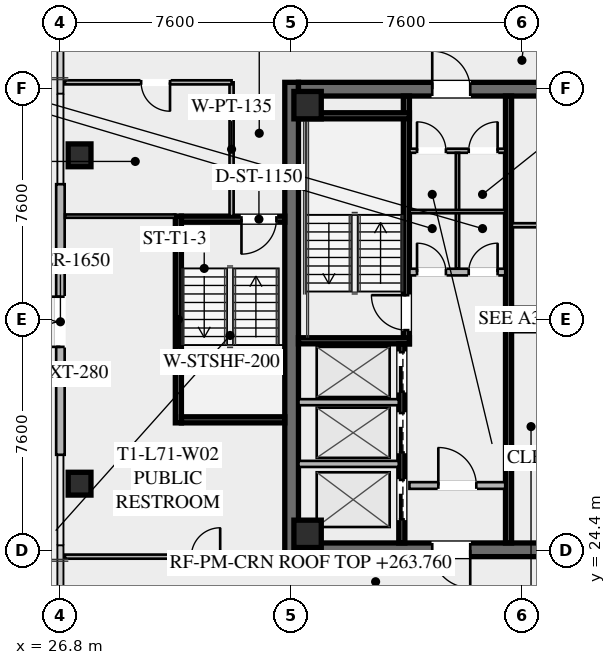
"""IFC4 building model, lengths in metres.
Left out: names, types, materials, properties, quantities, classifications, styles, units other than length and angle.
Written with IfcOpenShell. Run it as: python <this file> out.ifc"""

import sys

from ifc_helpers import new_model, si_unit, direction, frame, frame_2d, origin, origin_2d, place, context, subcontext, project, spatial, rectangle, hollow_rectangle, extrude, element, fill, save


model = new_model("IFC4")
c1 = context("Model", 3, precision=1e-05, world=origin(), true_north=direction((0.0, 1.0)))
c2 = subcontext(c1, "Body", "Model", "MODEL_VIEW")
j1 = project(units=[si_unit("LENGTHUNIT", "METRE"), si_unit("PLANEANGLEUNIT", "RADIAN")], contexts=[c1])
p1 = place(None, origin())
s1 = spatial("IfcSite", under=j1, at=p1, CompositionType="ELEMENT")
p2 = place(p1, origin())
s2 = spatial("IfcBuilding", under=s1, at=p2, CompositionType="ELEMENT")
p3 = place(p2, frame((0.0, 0.0, 263.4)))
s3 = spatial("IfcBuildingStorey", under=s2, at=p3, CompositionType="ELEMENT", Elevation=263.4)
p4 = place(p3, frame((34.425, 24.2, 0.0), z_axis=(0.0, 0.0, 1.0), x_axis=(0.0, 1.0, 0.0)))
e1 = element("IfcWall", 1, at=p4, inside=s3, PredefinedType="SHEAR", context=c2, shape_type="SweptSolid", body=[
    extrude(rectangle(XDim=15.6, YDim=0.45, at=frame_2d((7.8, 0.0))), origin(), (0.0, 0.0, 1.0), 3.55),
])
p5 = place(p3, frame((49.35, 24.425, 0.0), z_axis=(0.0, 0.0, 1.0), x_axis=(-1.0, 0.0, 0.0)))
e2 = element("IfcWall", 2, at=p5, inside=s3, PredefinedType="SHEAR", context=c2, shape_type="SweptSolid", body=[
    extrude(rectangle(XDim=14.7, YDim=0.45, at=frame_2d((7.35, 0.0))), origin(), (0.0, 0.0, 1.0), 3.55),
])
p6 = place(p5, frame((9.05, 0.0, 0.0)))
e3 = element("IfcOpeningElement", 3, at=p6, cuts=e2, PredefinedType="OPENING", context=c2, shape_type="SweptSolid", body=[
    extrude(rectangle(XDim=1.25, YDim=2.25, at=frame_2d((0.625, 1.125))), frame((0.0, 0.235, 0.0), z_axis=(0.0, -1.0, 0.0), x_axis=(1.0, 0.0, 0.0)), (0.0, 0.0, 1.0), 0.47),
])
p7 = place(p5, frame((4.0, 0.0, 0.0)))
e4 = element("IfcOpeningElement", 4, at=p7, cuts=e2, PredefinedType="OPENING", context=c2, shape_type="SweptSolid", body=[
    extrude(rectangle(XDim=1.25, YDim=2.25, at=frame_2d((0.625, 1.125))), frame((0.0, 0.235, 0.0), z_axis=(0.0, -1.0, 0.0), x_axis=(1.0, 0.0, 0.0)), (0.0, 0.0, 1.0), 0.47),
])
p8 = place(p3, frame((34.65, 39.575, 0.0), z_axis=(0.0, 0.0, 1.0), x_axis=(1.0, 0.0, 0.0)))
e5 = element("IfcWall", 5, at=p8, inside=s3, PredefinedType="SHEAR", context=c2, shape_type="SweptSolid", body=[
    extrude(rectangle(XDim=14.7, YDim=0.45, at=frame_2d((7.35, 0.0))), origin(), (0.0, 0.0, 1.0), 3.55),
])
p9 = place(p8, frame((4.4, 0.0, 0.0)))
e6 = element("IfcOpeningElement", 6, at=p9, cuts=e5, PredefinedType="OPENING", context=c2, shape_type="SweptSolid", body=[
    extrude(rectangle(XDim=1.25, YDim=2.25, at=frame_2d((0.625, 1.125))), frame((0.0, 0.235, 0.0), z_axis=(0.0, -1.0, 0.0), x_axis=(1.0, 0.0, 0.0)), (0.0, 0.0, 1.0), 0.47),
])
p10 = place(p8, frame((9.45, 0.0, 0.0)))
e7 = element("IfcOpeningElement", 7, at=p10, cuts=e5, PredefinedType="OPENING", context=c2, shape_type="SweptSolid", body=[
    extrude(rectangle(XDim=1.25, YDim=2.25, at=frame_2d((0.625, 1.125))), frame((0.0, 0.235, 0.0), z_axis=(0.0, -1.0, 0.0), x_axis=(1.0, 0.0, 0.0)), (0.0, 0.0, 1.0), 0.47),
])
for number, where, z_axis, x_axis in (
    (8, (34.95, 24.95, 0.0), (0.0, 0.0, 1.0), (1.0, 0.0, 0.0)),
    (9, (34.95, 39.05, 0.0), (0.0, 0.0, 1.0), (1.0, 0.0, 0.0)),
):
    element("IfcColumn", number, at=place(p3, frame(where, z_axis=z_axis, x_axis=x_axis)), inside=s3, PredefinedType="COLUMN", context=c2, shape_type="SweptSolid", body=[
        extrude(hollow_rectangle(XDim=0.9, YDim=0.9, WallThickness=0.04, at=origin_2d()), origin(), (0.0, 0.0, 1.0), 3.37),
    ])
for number, where, z_axis, x_axis in (
    (10, (27.45, 37.4, -0.295), (0.0, 0.0, 1.0), (1.0, 0.0, 0.0)),
    (11, (27.45, 26.6, -0.295), (0.0, 0.0, 1.0), (1.0, 0.0, 0.0)),
):
    element("IfcColumn", number, at=place(p3, frame(where, z_axis=z_axis, x_axis=x_axis)), inside=s3, PredefinedType="COLUMN", context=c2, shape_type="SweptSolid", body=[
        extrude(hollow_rectangle(XDim=0.75, YDim=0.75, WallThickness=0.032, at=origin_2d()), origin(), (0.0, 0.0, 1.0), 3.665),
    ])
p11 = place(p3, frame((26.82, 27.55, 0.0), z_axis=(0.0, 0.0, 1.0), x_axis=(0.0, 1.0, 0.0)))
e12 = element("IfcWall", 12, at=p11, inside=s3, PredefinedType="SOLIDWALL", context=c2, shape_type="SweptSolid", body=[
    extrude(rectangle(XDim=8.9, YDim=0.28, at=frame_2d((4.45, 0.0))), origin(), (0.0, 0.0, 1.0), 3.37),
])
p12 = place(p11, frame((3.55, 0.0, 0.0)))
e13 = element("IfcOpeningElement", 13, at=p12, cuts=e12, PredefinedType="OPENING", context=c2, shape_type="SweptSolid", body=[
    extrude(rectangle(XDim=1.65, YDim=2.2, at=frame_2d((0.825, 1.1))), frame((0.0, 0.15, 0.0), z_axis=(0.0, -1.0, 0.0), x_axis=(1.0, 0.0, 0.0)), (0.0, 0.0, 1.0), 0.3),
])
p13 = place(p3, frame((38.2, 31.2, 0.0), z_axis=(0.0, 0.0, 1.0), x_axis=(0.0, 1.0, 0.0)))
e14 = element("IfcWall", 14, at=p13, inside=s3, PredefinedType="SHEAR", context=c2, shape_type="SweptSolid", body=[
    extrude(rectangle(XDim=8.15, YDim=0.2, at=frame_2d((4.075, 0.0))), origin(), (0.0, 0.0, 1.0), 3.37),
])
p14 = place(p13, frame((0.45, 0.0, 0.0)))
e15 = element("IfcOpeningElement", 15, at=p14, cuts=e14, PredefinedType="OPENING", context=c2, shape_type="SweptSolid", body=[
    extrude(rectangle(XDim=1.15, YDim=2.2, at=frame_2d((0.575, 1.1))), frame((0.0, 0.11, 0.0), z_axis=(0.0, -1.0, 0.0), x_axis=(1.0, 0.0, 0.0)), (0.0, 0.0, 1.0), 0.22),
])
for number, where, z_axis, x_axis in (
    (16, (34.65, 31.3, 0.0), (0.0, 0.0, 1.0), (1.0, 0.0, 0.0)),
    (17, (34.65, 38.7, 0.0), (0.0, 0.0, 1.0), (1.0, 0.0, 0.0)),
):
    element("IfcWall", number, at=place(p3, frame(where, z_axis=z_axis, x_axis=x_axis)), inside=s3, PredefinedType="SHEAR", context=c2, shape_type="SweptSolid", body=[
        extrude(rectangle(XDim=3.65, YDim=0.2, at=frame_2d((1.825, 0.0))), origin(), (0.0, 0.0, 1.0), 3.37),
    ])
p15 = place(p3, frame((41.56, 24.65, 0.0), z_axis=(0.0, 0.0, 1.0), x_axis=(0.0, 1.0, 0.0)))
e18 = element("IfcWall", 18, at=p15, inside=s3, PredefinedType="SHEAR", context=c2, shape_type="SweptSolid", body=[
    extrude(rectangle(XDim=14.7, YDim=0.2, at=frame_2d((7.35, 0.0))), origin(), (0.0, 0.0, 1.0), 3.37),
])
p16 = place(p3, frame((38.3, 33.56, 0.0), z_axis=(0.0, 0.0, 1.0), x_axis=(1.0, 0.0, 0.0)))
e19 = element("IfcWall", 19, at=p16, inside=s3, PredefinedType="SOLIDWALL", context=c2, shape_type="SweptSolid", body=[
    extrude(rectangle(XDim=3.15, YDim=0.22, at=frame_2d((1.575, 0.0))), origin(), (0.0, 0.0, 1.0), 2.723),
])
p17 = place(p16, frame((0.25, 0.0, 0.0)))
e20 = element("IfcOpeningElement", 20, at=p17, cuts=e19, PredefinedType="OPENING", context=c2, shape_type="SweptSolid", body=[
    extrude(rectangle(XDim=0.95, YDim=2.05, at=frame_2d((0.475, 1.025))), frame((0.0, 0.12, 0.0), z_axis=(0.0, -1.0, 0.0), x_axis=(1.0, 0.0, 0.0)), (0.0, 0.0, 1.0), 0.24),
])
p18 = place(p16, frame((1.95, 0.0, 0.0)))
e21 = element("IfcOpeningElement", 21, at=p18, cuts=e19, PredefinedType="OPENING", context=c2, shape_type="SweptSolid", body=[
    extrude(rectangle(XDim=0.95, YDim=2.05, at=frame_2d((0.475, 1.025))), frame((0.0, 0.12, 0.0), z_axis=(0.0, -1.0, 0.0), x_axis=(1.0, 0.0, 0.0)), (0.0, 0.0, 1.0), 0.24),
])
p19 = place(p3, frame((38.3, 26.54, 0.0), z_axis=(0.0, 0.0, 1.0), x_axis=(1.0, 0.0, 0.0)))
e22 = element("IfcWall", 22, at=p19, inside=s3, PredefinedType="SOLIDWALL", context=c2, shape_type="SweptSolid", body=[
    extrude(rectangle(XDim=3.15, YDim=0.22, at=frame_2d((1.575, 0.0))), origin(), (0.0, 0.0, 1.0), 2.723),
])
p20 = place(p19, frame((0.95, 0.0, 0.0)))
e23 = element("IfcOpeningElement", 23, at=p20, cuts=e22, PredefinedType="OPENING", context=c2, shape_type="SweptSolid", body=[
    extrude(rectangle(XDim=1.25, YDim=2.25, at=frame_2d((0.625, 1.125))), frame((0.0, 0.12, 0.0), z_axis=(0.0, -1.0, 0.0), x_axis=(1.0, 0.0, 0.0)), (0.0, 0.0, 1.0), 0.24),
])
p21 = place(p3, frame((38.05, 24.65, 0.0), z_axis=(0.0, 0.0, 1.0), x_axis=(0.0, 1.0, 0.0)))
e24 = element("IfcWall", 24, at=p21, inside=s3, PredefinedType="SHEAR", context=c2, shape_type="SweptSolid", body=[
    extrude(rectangle(XDim=6.55, YDim=0.2, at=frame_2d((3.275, 0.0))), origin(), (0.0, 0.0, 1.0), 3.37),
])
p22 = place(p21, frame((4.975, 0.0, 0.0)))
e25 = element("IfcOpeningElement", 25, at=p22, cuts=e24, PredefinedType="OPENING", context=c2, shape_type="SweptSolid", body=[
    extrude(rectangle(XDim=1.3, YDim=2.25, at=frame_2d((0.65, 1.125))), frame((0.0, 0.11, 0.0), z_axis=(0.0, -1.0, 0.0), x_axis=(1.0, 0.0, 0.0)), (0.0, 0.0, 1.0), 0.22),
])
p23 = place(p21, frame((2.975, 0.0, 0.0)))
e26 = element("IfcOpeningElement", 26, at=p23, cuts=e24, PredefinedType="OPENING", context=c2, shape_type="SweptSolid", body=[
    extrude(rectangle(XDim=1.3, YDim=2.25, at=frame_2d((0.65, 1.125))), frame((0.0, 0.11, 0.0), z_axis=(0.0, -1.0, 0.0), x_axis=(1.0, 0.0, 0.0)), (0.0, 0.0, 1.0), 0.22),
])
p24 = place(p21, frame((0.775, 0.0, 0.0)))
e27 = element("IfcOpeningElement", 27, at=p24, cuts=e24, PredefinedType="OPENING", context=c2, shape_type="SweptSolid", body=[
    extrude(rectangle(XDim=1.3, YDim=2.25, at=frame_2d((0.65, 1.125))), frame((0.0, 0.11, 0.0), z_axis=(0.0, -1.0, 0.0), x_axis=(1.0, 0.0, 0.0)), (0.0, 0.0, 1.0), 0.22),
])
for number, where, z_axis, x_axis in (
    (28, (34.65, 27.25, 0.0), (0.0, 0.0, 1.0), (1.0, 0.0, 0.0)),
    (29, (34.65, 29.28, 0.0), (0.0, 0.0, 1.0), (1.0, 0.0, 0.0)),
):
    element("IfcWall", number, at=place(p3, frame(where, z_axis=z_axis, x_axis=x_axis)), inside=s3, PredefinedType="SOLIDWALL", context=c2, shape_type="SweptSolid", body=[
        extrude(rectangle(XDim=3.3, YDim=0.2, at=frame_2d((1.65, 0.0))), origin(), (0.0, 0.0, 1.0), 3.37),
    ])
p25 = place(p3, frame((38.3, 37.55, 0.0), z_axis=(0.0, 0.0, 1.0), x_axis=(1.0, 0.0, 0.0)))
e30 = element("IfcWall", 30, at=p25, inside=s3, PredefinedType="PARTITIONING", context=c2, shape_type="SweptSolid", body=[
    extrude(rectangle(XDim=3.15, YDim=0.135, at=frame_2d((1.575, 0.0))), origin(), (0.0, 0.0, 1.0), 2.723),
])
p26 = place(p25, frame((0.25, 0.0, 0.0)))
e31 = element("IfcOpeningElement", 31, at=p26, cuts=e30, PredefinedType="OPENING", context=c2, shape_type="SweptSolid", body=[
    extrude(rectangle(XDim=0.95, YDim=2.05, at=frame_2d((0.475, 1.025))), frame((0.0, 0.077, 0.0), z_axis=(0.0, -1.0, 0.0), x_axis=(1.0, 0.0, 0.0)), (0.0, 0.0, 1.0), 0.155),
])
p27 = place(p25, frame((1.95, 0.0, 0.0)))
e32 = element("IfcOpeningElement", 32, at=p27, cuts=e30, PredefinedType="OPENING", context=c2, shape_type="SweptSolid", body=[
    extrude(rectangle(XDim=0.95, YDim=2.05, at=frame_2d((0.475, 1.025))), frame((0.0, 0.077, 0.0), z_axis=(0.0, -1.0, 0.0), x_axis=(1.0, 0.0, 0.0)), (0.0, 0.0, 1.0), 0.155),
])
p28 = place(p3, frame((39.88, 33.68, 0.0), z_axis=(0.0, 0.0, 1.0), x_axis=(0.0, 1.0, 0.0)))
e33 = element("IfcWall", 33, at=p28, inside=s3, PredefinedType="PARTITIONING", context=c2, shape_type="SweptSolid", body=[
    extrude(rectangle(XDim=3.8, YDim=0.11, at=frame_2d((1.9, 0.0))), origin(), (0.0, 0.0, 1.0), 2.723),
])
p29 = place(p3, frame((38.3, 35.55, 0.0), z_axis=(0.0, 0.0, 1.0), x_axis=(1.0, 0.0, 0.0)))
e34 = element("IfcWall", 34, at=p29, inside=s3, PredefinedType="PARTITIONING", context=c2, shape_type="SweptSolid", body=[
    extrude(rectangle(XDim=3.15, YDim=0.11, at=frame_2d((1.575, 0.0))), origin(), (0.0, 0.0, 1.0), 2.723),
])
for number, where, z_axis, x_axis in (
    (35, (41.67, 31.65, 0.0), (0.0, 0.0, 1.0), (1.0, 0.0, 0.0)),
    (36, (41.67, 27.6, 0.0), (0.0, 0.0, 1.0), (1.0, 0.0, 0.0)),
    (37, (41.67, 32.35, 0.0), (0.0, 0.0, 1.0), (1.0, 0.0, 0.0)),
    (38, (41.67, 35.1, 0.0), (0.0, 0.0, 1.0), (1.0, 0.0, 0.0)),
):
    element("IfcWall", number, at=place(p3, frame(where, z_axis=z_axis, x_axis=x_axis)), inside=s3, PredefinedType="PARTITIONING", context=c2, shape_type="SweptSolid", body=[
        extrude(rectangle(XDim=1.88, YDim=0.135, at=frame_2d((0.94, 0.0))), origin(), (0.0, 0.0, 1.0), 2.723),
    ])
p30 = place(p3, frame((30.7, 28.6, 0.0), z_axis=(0.0, 0.0, 1.0), x_axis=(0.0, 1.0, 0.0)))
e39 = element("IfcWall", 39, at=p30, inside=s3, PredefinedType="SHEAR", context=c2, shape_type="SweptSolid", body=[
    extrude(rectangle(XDim=6.8, YDim=0.2, at=frame_2d((3.4, 0.0))), origin(), (0.0, 0.0, 1.0), 3.37),
])
p31 = place(p3, frame((34.2, 35.3, 0.0), z_axis=(0.0, 0.0, 1.0), x_axis=(-1.0, 0.0, 0.0)))
e40 = element("IfcWall", 40, at=p31, inside=s3, PredefinedType="SHEAR", context=c2, shape_type="SweptSolid", body=[
    extrude(rectangle(XDim=3.4, YDim=0.2, at=frame_2d((1.7, 0.0))), origin(), (0.0, 0.0, 1.0), 3.37),
])
p32 = place(p31, frame((0.275, 0.0, 0.0)))
e41 = element("IfcOpeningElement", 41, at=p32, cuts=e40, PredefinedType="OPENING", context=c2, shape_type="SweptSolid", body=[
    extrude(rectangle(XDim=1.15, YDim=2.2, at=frame_2d((0.575, 1.1))), frame((0.0, 0.11, 0.0), z_axis=(0.0, -1.0, 0.0), x_axis=(1.0, 0.0, 0.0)), (0.0, 0.0, 1.0), 0.22),
])
p33 = place(p3, frame((30.8, 28.7, 0.0), z_axis=(0.0, 0.0, 1.0), x_axis=(1.0, 0.0, 0.0)))
e42 = element("IfcWall", 42, at=p33, inside=s3, PredefinedType="SHEAR", context=c2, shape_type="SweptSolid", body=[
    extrude(rectangle(XDim=3.4, YDim=0.2, at=frame_2d((1.7, 0.0))), origin(), (0.0, 0.0, 1.0), 3.37),
])
p34 = place(p3, frame((32.45, 35.4, 0.0), z_axis=(0.0, 0.0, 1.0), x_axis=(0.0, 1.0, 0.0)))
e43 = element("IfcWall", 43, at=p34, inside=s3, PredefinedType="PARTITIONING", context=c2, shape_type="SweptSolid", body=[
    extrude(rectangle(XDim=4.4, YDim=0.135, at=frame_2d((2.2, 0.0))), origin(), (0.0, 0.0, 1.0), 2.723),
])
p35 = place(p3, frame((32.45, 39.8, 0.0), z_axis=(0.0, 0.0, 1.0), x_axis=(-1.0, 0.0, 0.0)))
e44 = element("IfcWall", 44, at=p35, inside=s3, PredefinedType="PARTITIONING", context=c2, shape_type="SweptSolid", body=[
    extrude(rectangle(XDim=5.48, YDim=0.135, at=frame_2d((2.74, 0.0))), origin(), (0.0, 0.0, 1.0), 2.723),
])
p36 = place(p35, frame((2.025, 0.0, 0.0)))
e45 = element("IfcOpeningElement", 45, at=p36, cuts=e44, PredefinedType="OPENING", context=c2, shape_type="SweptSolid", body=[
    extrude(rectangle(XDim=0.95, YDim=2.05, at=frame_2d((0.475, 1.025))), frame((0.0, 0.077, 0.0), z_axis=(0.0, -1.0, 0.0), x_axis=(1.0, 0.0, 0.0)), (0.0, 0.0, 1.0), 0.155),
])
p37 = place(p3, frame((26.97, 24.2, 0.0), z_axis=(0.0, 0.0, 1.0), x_axis=(1.0, 0.0, 0.0)))
e46 = element("IfcWall", 46, at=p37, inside=s3, PredefinedType="PARTITIONING", context=c2, shape_type="SweptSolid", body=[
    extrude(rectangle(XDim=7.15, YDim=0.135, at=frame_2d((3.575, 0.0))), origin(), (0.0, 0.0, 1.0), 2.723),
])
p38 = place(p37, frame((4.155, 0.0, 0.0)))
e47 = element("IfcOpeningElement", 47, at=p38, cuts=e46, PredefinedType="OPENING", context=c2, shape_type="SweptSolid", body=[
    extrude(rectangle(XDim=0.95, YDim=2.05, at=frame_2d((0.475, 1.025))), frame((0.0, 0.077, 0.0), z_axis=(0.0, -1.0, 0.0), x_axis=(1.0, 0.0, 0.0)), (0.0, 0.0, 1.0), 0.155),
])
p39 = place(p3, frame((30.6, 35.4, 0.0), z_axis=(0.0, 0.0, 1.0), x_axis=(-1.0, 0.0, 0.0)))
e48 = element("IfcWall", 48, at=p39, inside=s3, PredefinedType="PARTITIONING", context=c2, shape_type="SweptSolid", body=[
    extrude(rectangle(XDim=3.63, YDim=0.11, at=frame_2d((1.815, 0.0))), origin(), (0.0, 0.0, 1.0), 2.723),
])
p40 = place(p12, origin())
e49 = element("IfcDoor", 49, at=p40, inside=s3, OperationType="DOUBLE_DOOR_SINGLE_SWING", PredefinedType="DOOR", context=c2, shape_type="SweptSolid", body=[
    extrude(rectangle(XDim=1.65, YDim=2.2, at=frame_2d((0.825, 1.1))), frame((0.0, 0.025, 0.0), z_axis=(0.0, -1.0, 0.0), x_axis=(1.0, 0.0, 0.0)), (0.0, 0.0, 1.0), 0.05),
])
fill(e13, e49)
p41 = place(p9, origin())
e50 = element("IfcDoor", 50, at=p41, inside=s3, OperationType="SINGLE_SWING_LEFT", PredefinedType="DOOR", context=c2, shape_type="SweptSolid", body=[
    extrude(rectangle(XDim=1.25, YDim=2.25, at=frame_2d((0.625, 1.125))), frame((0.0, 0.025, 0.0), z_axis=(0.0, -1.0, 0.0), x_axis=(1.0, 0.0, 0.0)), (0.0, 0.0, 1.0), 0.05),
])
fill(e6, e50)
p42 = place(p6, origin())
e51 = element("IfcDoor", 51, at=p42, inside=s3, OperationType="SINGLE_SWING_LEFT", PredefinedType="DOOR", context=c2, shape_type="SweptSolid", body=[
    extrude(rectangle(XDim=1.25, YDim=2.25, at=frame_2d((0.625, 1.125))), frame((0.0, 0.025, 0.0), z_axis=(0.0, -1.0, 0.0), x_axis=(1.0, 0.0, 0.0)), (0.0, 0.0, 1.0), 0.05),
])
fill(e3, e51)
p43 = place(p14, origin())
e52 = element("IfcDoor", 52, at=p43, inside=s3, OperationType="SINGLE_SWING_RIGHT", PredefinedType="DOOR", context=c2, shape_type="SweptSolid", body=[
    extrude(rectangle(XDim=1.15, YDim=2.2, at=frame_2d((0.575, 1.1))), frame((0.0, 0.025, 0.0), z_axis=(0.0, -1.0, 0.0), x_axis=(1.0, 0.0, 0.0)), (0.0, 0.0, 1.0), 0.05),
])
fill(e15, e52)
p44 = place(p20, origin())
e53 = element("IfcDoor", 53, at=p44, inside=s3, OperationType="SINGLE_SWING_LEFT", PredefinedType="DOOR", context=c2, shape_type="SweptSolid", body=[
    extrude(rectangle(XDim=1.25, YDim=2.25, at=frame_2d((0.625, 1.125))), frame((0.0, 0.025, 0.0), z_axis=(0.0, -1.0, 0.0), x_axis=(1.0, 0.0, 0.0)), (0.0, 0.0, 1.0), 0.05),
])
fill(e23, e53)
p45 = place(p26, origin())
e54 = element("IfcDoor", 54, at=p45, inside=s3, OperationType="SINGLE_SWING_LEFT", PredefinedType="DOOR", context=c2, shape_type="SweptSolid", body=[
    extrude(rectangle(XDim=0.95, YDim=2.05, at=frame_2d((0.475, 1.025))), frame((0.0, 0.025, 0.0), z_axis=(0.0, -1.0, 0.0), x_axis=(1.0, 0.0, 0.0)), (0.0, 0.0, 1.0), 0.05),
])
fill(e31, e54)
p46 = place(p27, origin())
e55 = element("IfcDoor", 55, at=p46, inside=s3, OperationType="SINGLE_SWING_RIGHT", PredefinedType="DOOR", context=c2, shape_type="SweptSolid", body=[
    extrude(rectangle(XDim=0.95, YDim=2.05, at=frame_2d((0.475, 1.025))), frame((0.0, 0.025, 0.0), z_axis=(0.0, -1.0, 0.0), x_axis=(1.0, 0.0, 0.0)), (0.0, 0.0, 1.0), 0.05),
])
fill(e32, e55)
p47 = place(p17, origin())
e56 = element("IfcDoor", 56, at=p47, inside=s3, OperationType="SINGLE_SWING_LEFT", PredefinedType="DOOR", context=c2, shape_type="SweptSolid", body=[
    extrude(rectangle(XDim=0.95, YDim=2.05, at=frame_2d((0.475, 1.025))), frame((0.0, 0.025, 0.0), z_axis=(0.0, -1.0, 0.0), x_axis=(1.0, 0.0, 0.0)), (0.0, 0.0, 1.0), 0.05),
])
fill(e20, e56)
p48 = place(p18, origin())
e57 = element("IfcDoor", 57, at=p48, inside=s3, OperationType="SINGLE_SWING_RIGHT", PredefinedType="DOOR", context=c2, shape_type="SweptSolid", body=[
    extrude(rectangle(XDim=0.95, YDim=2.05, at=frame_2d((0.475, 1.025))), frame((0.0, 0.025, 0.0), z_axis=(0.0, -1.0, 0.0), x_axis=(1.0, 0.0, 0.0)), (0.0, 0.0, 1.0), 0.05),
])
fill(e21, e57)
p49 = place(p32, origin())
e58 = element("IfcDoor", 58, at=p49, inside=s3, OperationType="SINGLE_SWING_RIGHT", PredefinedType="DOOR", context=c2, shape_type="SweptSolid", body=[
    extrude(rectangle(XDim=1.15, YDim=2.2, at=frame_2d((0.575, 1.1))), frame((0.0, 0.025, 0.0), z_axis=(0.0, -1.0, 0.0), x_axis=(1.0, 0.0, 0.0)), (0.0, 0.0, 1.0), 0.05),
])
fill(e41, e58)
p50 = place(p36, origin())
e59 = element("IfcDoor", 59, at=p50, inside=s3, OperationType="SINGLE_SWING_LEFT", PredefinedType="DOOR", context=c2, shape_type="SweptSolid", body=[
    extrude(rectangle(XDim=0.95, YDim=2.05, at=frame_2d((0.475, 1.025))), frame((0.0, 0.025, 0.0), z_axis=(0.0, -1.0, 0.0), x_axis=(1.0, 0.0, 0.0)), (0.0, 0.0, 1.0), 0.05),
])
fill(e45, e59)
p51 = place(p38, origin())
e60 = element("IfcDoor", 60, at=p51, inside=s3, OperationType="SINGLE_SWING_RIGHT", PredefinedType="DOOR", context=c2, shape_type="SweptSolid", body=[
    extrude(rectangle(XDim=0.95, YDim=2.05, at=frame_2d((0.475, 1.025))), frame((0.0, 0.025, 0.0), z_axis=(0.0, -1.0, 0.0), x_axis=(1.0, 0.0, 0.0)), (0.0, 0.0, 1.0), 0.05),
])
fill(e47, e60)
p52 = place(p22, origin())
e61 = element("IfcDoor", 61, at=p52, inside=s3, OperationType="SLIDING_TO_LEFT", PredefinedType="DOOR", context=c2, shape_type="SweptSolid", body=[
    extrude(rectangle(XDim=1.3, YDim=2.25, at=frame_2d((0.65, 1.125))), frame((0.0, 0.025, 0.0), z_axis=(0.0, -1.0, 0.0), x_axis=(1.0, 0.0, 0.0)), (0.0, 0.0, 1.0), 0.05),
])
fill(e25, e61)
p53 = place(p23, origin())
e62 = element("IfcDoor", 62, at=p53, inside=s3, OperationType="SLIDING_TO_LEFT", PredefinedType="DOOR", context=c2, shape_type="SweptSolid", body=[
    extrude(rectangle(XDim=1.3, YDim=2.25, at=frame_2d((0.65, 1.125))), frame((0.0, 0.025, 0.0), z_axis=(0.0, -1.0, 0.0), x_axis=(1.0, 0.0, 0.0)), (0.0, 0.0, 1.0), 0.05),
])
fill(e26, e62)
p54 = place(p24, origin())
e63 = element("IfcDoor", 63, at=p54, inside=s3, OperationType="SLIDING_TO_LEFT", PredefinedType="DOOR", context=c2, shape_type="SweptSolid", body=[
    extrude(rectangle(XDim=1.3, YDim=2.25, at=frame_2d((0.65, 1.125))), frame((0.0, 0.025, 0.0), z_axis=(0.0, -1.0, 0.0), x_axis=(1.0, 0.0, 0.0)), (0.0, 0.0, 1.0), 0.05),
])
fill(e27, e63)
save(model, sys.argv[1])
